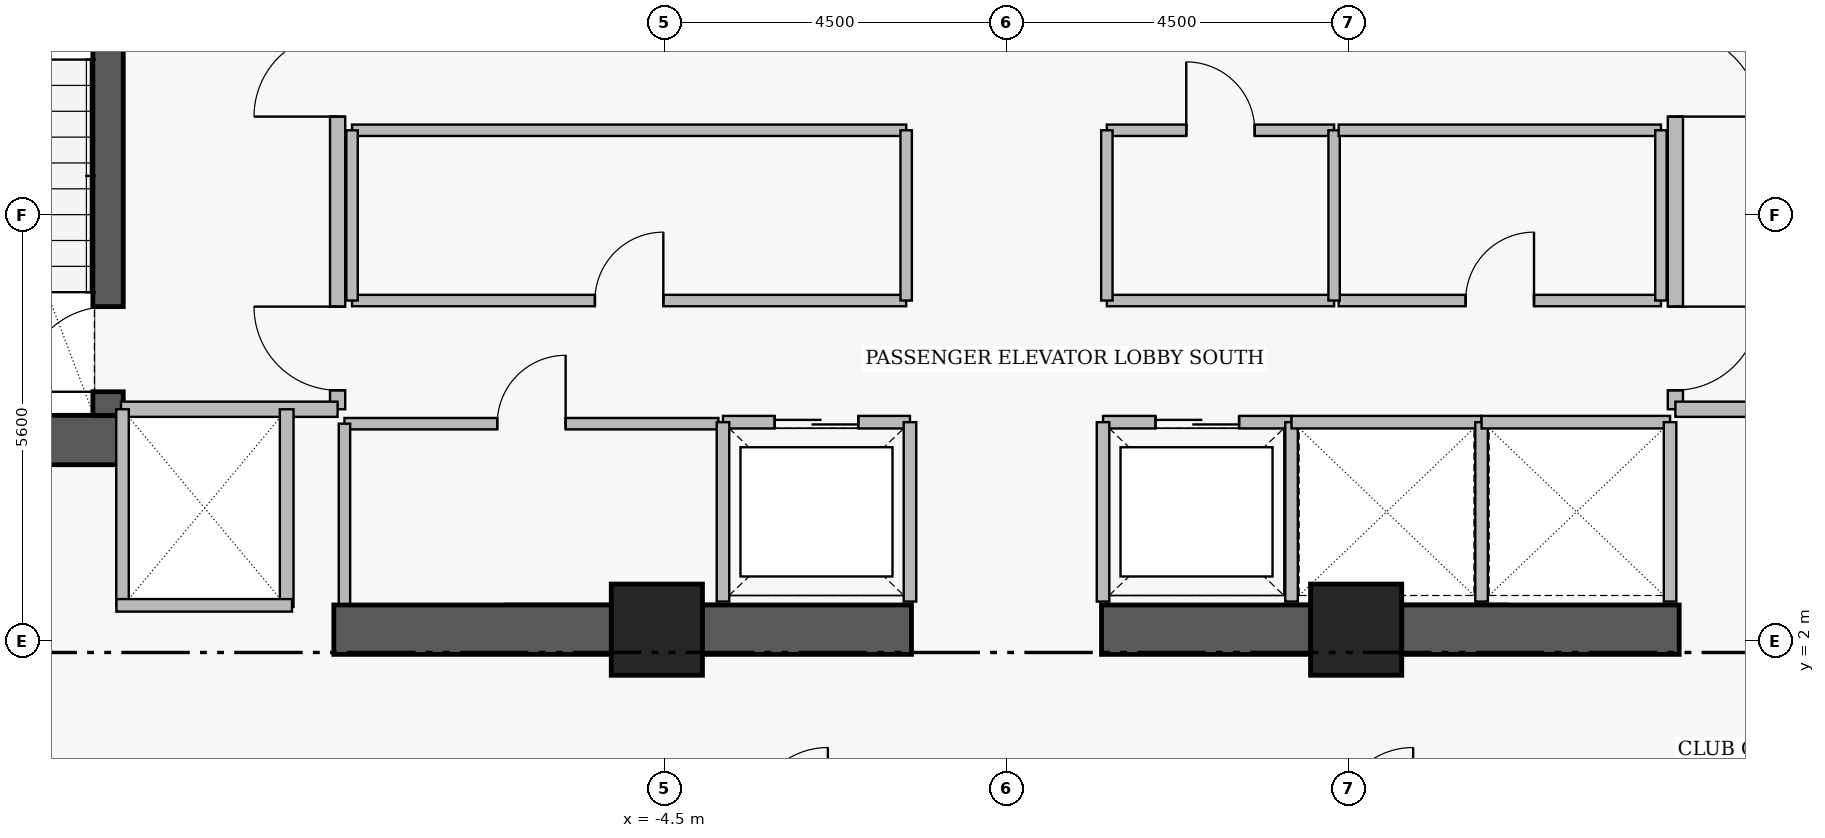
"""IFC4 building model, lengths in metres.
Left out: names, types, materials, properties, quantities, classifications, styles, units other than length and angle.
Written with IfcOpenShell. Run it as: python <this file> out.ifc"""

import sys

from ifc_helpers import new_model, si_unit, direction, frame, frame_2d, origin, origin_2d, place, context, subcontext, project, spatial, rectangle, extrude, element, fill, save


model = new_model("IFC4")
c1 = context("Model", 3, precision=1e-05, world=origin(), true_north=direction((0.0, 1.0)))
c2 = subcontext(c1, "Body", "Model", "MODEL_VIEW")
j1 = project(units=[si_unit("LENGTHUNIT", "METRE"), si_unit("PLANEANGLEUNIT", "RADIAN")], contexts=[c1])
p1 = place(None, origin())
s1 = spatial("IfcSite", under=j1, at=p1, CompositionType="ELEMENT")
p2 = place(p1, origin())
s2 = spatial("IfcBuilding", under=s1, at=p2, CompositionType="ELEMENT")
p3 = place(p2, frame((0.0, 0.0, 199.9)))
s3 = spatial("IfcBuildingStorey", under=s2, at=p3, CompositionType="ELEMENT", Elevation=199.9)
p4 = place(p3, frame((-16.06, 4.645, 0.0), z_axis=(0.0, 0.0, 1.0), x_axis=(1.0, 0.0, 0.0)))
e1 = element("IfcWall", 1, at=p4, inside=s3, PredefinedType="SHEAR", context=c2, shape_type="SweptSolid", body=[
    extrude(rectangle(XDim=4.46, YDim=0.65, at=frame_2d((2.23, 0.0))), origin(), (0.0, 0.0, 1.0), 3.56),
])
for number, where, z_axis, x_axis in (
    (2, (-8.85, 2.15, 0.0), (0.0, 0.0, 1.0), (1.0, 0.0, 0.0)),
    (3, (1.25, 2.15, 0.0), (0.0, 0.0, 1.0), (1.0, 0.0, 0.0)),
):
    element("IfcWall", number, at=place(p3, frame(where, z_axis=z_axis, x_axis=x_axis)), inside=s3, PredefinedType="SHEAR", context=c2, shape_type="SweptSolid", body=[
        extrude(rectangle(XDim=7.6, YDim=0.65, at=frame_2d((3.8, 0.0))), origin(), (0.0, 0.0, 1.0), 3.53),
    ])
p5 = place(p3, frame((-11.82, 4.97, 0.0), z_axis=(0.0, 0.0, 1.0), x_axis=(0.0, 1.0, 0.0)))
e4 = element("IfcWall", 4, at=p5, inside=s3, PredefinedType="SHEAR", context=c2, shape_type="SweptSolid", body=[
    extrude(rectangle(XDim=8.96, YDim=0.4, at=frame_2d((4.48, 0.0))), origin(), (0.0, 0.0, 1.0), 3.56),
])
p6 = place(p5, frame((0.31, 0.0, 0.0)))
e5 = element("IfcOpeningElement", 5, at=p6, cuts=e4, PredefinedType="OPENING", context=c2, shape_type="SweptSolid", body=[
    extrude(rectangle(XDim=1.12, YDim=2.22, at=frame_2d((0.56, 1.11))), frame((0.0, 0.21, 0.0), z_axis=(0.0, -1.0, 0.0), x_axis=(1.0, 0.0, 0.0)), (0.0, 0.0, 1.0), 0.42),
])
for number, where, z_axis, x_axis in (
    (6, (-4.6, 2.15, 0.0), (0.0, 0.0, 1.0), (1.0, 0.0, 0.0)),
    (7, (4.6, 2.15, 0.0), (0.0, 0.0, 1.0), (1.0, 0.0, 0.0)),
):
    element("IfcColumn", number, at=place(p3, frame(where, z_axis=z_axis, x_axis=x_axis)), inside=s3, PredefinedType="COLUMN", context=c2, shape_type="SweptSolid", body=[
        extrude(rectangle(XDim=1.2, YDim=1.2, at=origin_2d()), origin(), (0.0, 0.0, 1.0), 3.75),
    ])
p7 = place(p3, frame((-8.8, 5.05, 0.0), z_axis=(0.0, 0.0, 1.0), x_axis=(0.0, 1.0, 0.0)))
e8 = element("IfcWall", 8, at=p7, inside=s3, PredefinedType="PARTITIONING", context=c2, shape_type="SweptSolid", body=[
    extrude(rectangle(XDim=6.1, YDim=0.2, at=frame_2d((3.05, 0.0))), origin(), (0.0, 0.0, 1.0), 3.53),
])
p8 = place(p7, frame((0.25, 0.0, 0.0)))
e9 = element("IfcOpeningElement", 9, at=p8, cuts=e8, PredefinedType="OPENING", context=c2, shape_type="SweptSolid", body=[
    extrude(rectangle(XDim=1.1, YDim=2.2, at=frame_2d((0.55, 1.1))), frame((0.0, 0.11, 0.0), z_axis=(0.0, -1.0, 0.0), x_axis=(1.0, 0.0, 0.0)), (0.0, 0.0, 1.0), 0.22),
])
p9 = place(p7, frame((3.85, 0.0, 0.0)))
e10 = element("IfcOpeningElement", 10, at=p9, cuts=e8, PredefinedType="OPENING", context=c2, shape_type="SweptSolid", body=[
    extrude(rectangle(XDim=1.1, YDim=2.2, at=frame_2d((0.55, 1.1))), frame((0.0, 0.11, 0.0), z_axis=(0.0, -1.0, 0.0), x_axis=(1.0, 0.0, 0.0)), (0.0, 0.0, 1.0), 0.22),
])
p10 = place(p3, frame((8.8, 11.15, 0.0), z_axis=(0.0, 0.0, 1.0), x_axis=(0.0, -1.0, 0.0)))
e11 = element("IfcWall", 11, at=p10, inside=s3, PredefinedType="PARTITIONING", context=c2, shape_type="SweptSolid", body=[
    extrude(rectangle(XDim=6.1, YDim=0.2, at=frame_2d((3.05, 0.0))), origin(), (0.0, 0.0, 1.0), 3.53),
])
p11 = place(p10, frame((1.15, 0.0, 0.0)))
e12 = element("IfcOpeningElement", 12, at=p11, cuts=e11, PredefinedType="OPENING", context=c2, shape_type="SweptSolid", body=[
    extrude(rectangle(XDim=1.1, YDim=2.2, at=frame_2d((0.55, 1.1))), frame((0.0, 0.11, 0.0), z_axis=(0.0, -1.0, 0.0), x_axis=(1.0, 0.0, 0.0)), (0.0, 0.0, 1.0), 0.22),
])
p12 = place(p10, frame((4.75, 0.0, 0.0)))
e13 = element("IfcOpeningElement", 13, at=p12, cuts=e11, PredefinedType="OPENING", context=c2, shape_type="SweptSolid", body=[
    extrude(rectangle(XDim=1.1, YDim=2.2, at=frame_2d((0.55, 1.1))), frame((0.0, 0.11, 0.0), z_axis=(0.0, -1.0, 0.0), x_axis=(1.0, 0.0, 0.0)), (0.0, 0.0, 1.0), 0.22),
])
p13 = place(p3, frame((-3.73, 4.88, 0.0), z_axis=(0.0, 0.0, 1.0), x_axis=(1.0, 0.0, 0.0)))
e14 = element("IfcWall", 14, at=p13, inside=s3, PredefinedType="PARTITIONING", context=c2, shape_type="SweptSolid", body=[
    extrude(rectangle(XDim=2.46, YDim=0.165, at=frame_2d((1.23, 0.0))), origin(), (0.0, 0.0, 1.0), 3.53),
])
p14 = place(p13, frame((0.68, 0.0, 0.0)))
e15 = element("IfcOpeningElement", 15, at=p14, cuts=e14, PredefinedType="OPENING", context=c2, shape_type="SweptSolid", body=[
    extrude(rectangle(XDim=1.1, YDim=2.25, at=frame_2d((0.55, 1.125))), frame((0.0, 0.093, 0.0), z_axis=(0.0, -1.0, 0.0), x_axis=(1.0, 0.0, 0.0)), (0.0, 0.0, 1.0), 0.185),
])
p15 = place(p3, frame((1.27, 4.88, 0.0), z_axis=(0.0, 0.0, 1.0), x_axis=(1.0, 0.0, 0.0)))
e16 = element("IfcWall", 16, at=p15, inside=s3, PredefinedType="PARTITIONING", context=c2, shape_type="SweptSolid", body=[
    extrude(rectangle(XDim=2.48, YDim=0.165, at=frame_2d((1.24, 0.0))), origin(), (0.0, 0.0, 1.0), 3.53),
])
p16 = place(p15, frame((0.69, 0.0, 0.0)))
e17 = element("IfcOpeningElement", 17, at=p16, cuts=e16, PredefinedType="OPENING", context=c2, shape_type="SweptSolid", body=[
    extrude(rectangle(XDim=1.1, YDim=2.25, at=frame_2d((0.55, 1.125))), frame((0.0, 0.093, 0.0), z_axis=(0.0, -1.0, 0.0), x_axis=(1.0, 0.0, 0.0)), (0.0, 0.0, 1.0), 0.185),
])
p17 = place(p3, frame((-8.71, 4.86, 0.0), z_axis=(0.0, 0.0, 1.0), x_axis=(1.0, 0.0, 0.0)))
e18 = element("IfcWall", 18, at=p17, inside=s3, PredefinedType="PARTITIONING", context=c2, shape_type="SweptSolid", body=[
    extrude(rectangle(XDim=4.92, YDim=0.15, at=frame_2d((2.46, 0.0))), origin(), (0.0, 0.0, 1.0), 3.53),
])
p18 = place(p17, frame((2.01, 0.0, 0.0)))
e19 = element("IfcOpeningElement", 19, at=p18, cuts=e18, PredefinedType="OPENING", context=c2, shape_type="SweptSolid", body=[
    extrude(rectangle(XDim=0.9, YDim=2.15, at=frame_2d((0.45, 1.075))), frame((0.0, 0.085, 0.0), z_axis=(0.0, -1.0, 0.0), x_axis=(1.0, 0.0, 0.0)), (0.0, 0.0, 1.0), 0.17),
])
p19 = place(p3, frame((-8.61, 6.48, 0.0), z_axis=(0.0, 0.0, 1.0), x_axis=(1.0, 0.0, 0.0)))
e20 = element("IfcWall", 20, at=p19, inside=s3, PredefinedType="PARTITIONING", context=c2, shape_type="SweptSolid", body=[
    extrude(rectangle(XDim=7.29, YDim=0.15, at=frame_2d((3.645, 0.0))), origin(), (0.0, 0.0, 1.0), 3.53),
])
p20 = place(p19, frame((3.195, 0.0, 0.0)))
e21 = element("IfcOpeningElement", 21, at=p20, cuts=e20, PredefinedType="OPENING", context=c2, shape_type="SweptSolid", body=[
    extrude(rectangle(XDim=0.9, YDim=2.15, at=frame_2d((0.45, 1.075))), frame((0.0, 0.085, 0.0), z_axis=(0.0, -1.0, 0.0), x_axis=(1.0, 0.0, 0.0)), (0.0, 0.0, 1.0), 0.17),
])
p21 = place(p3, frame((1.32, 8.72, 0.0), z_axis=(0.0, 0.0, 1.0), x_axis=(1.0, 0.0, 0.0)))
e22 = element("IfcWall", 22, at=p21, inside=s3, PredefinedType="PARTITIONING", context=c2, shape_type="SweptSolid", body=[
    extrude(rectangle(XDim=2.99, YDim=0.15, at=frame_2d((1.495, 0.0))), origin(), (0.0, 0.0, 1.0), 3.53),
])
p22 = place(p21, frame((1.045, 0.0, 0.0)))
e23 = element("IfcOpeningElement", 23, at=p22, cuts=e22, PredefinedType="OPENING", context=c2, shape_type="SweptSolid", body=[
    extrude(rectangle(XDim=0.9, YDim=2.15, at=frame_2d((0.45, 1.075))), frame((0.0, 0.085, 0.0), z_axis=(0.0, -1.0, 0.0), x_axis=(1.0, 0.0, 0.0)), (0.0, 0.0, 1.0), 0.17),
])
p23 = place(p3, frame((4.37, 6.48, 0.0), z_axis=(0.0, 0.0, 1.0), x_axis=(1.0, 0.0, 0.0)))
e24 = element("IfcWall", 24, at=p23, inside=s3, PredefinedType="PARTITIONING", context=c2, shape_type="SweptSolid", body=[
    extrude(rectangle(XDim=4.24, YDim=0.15, at=frame_2d((2.12, 0.0))), origin(), (0.0, 0.0, 1.0), 3.53),
])
p24 = place(p23, frame((1.67, 0.0, 0.0)))
e25 = element("IfcOpeningElement", 25, at=p24, cuts=e24, PredefinedType="OPENING", context=c2, shape_type="SweptSolid", body=[
    extrude(rectangle(XDim=0.9, YDim=2.15, at=frame_2d((0.45, 1.075))), frame((0.0, 0.085, 0.0), z_axis=(0.0, -1.0, 0.0), x_axis=(1.0, 0.0, 0.0)), (0.0, 0.0, 1.0), 0.17),
])
for number, where, z_axis, x_axis in (
    (26, (-11.65, 5.05, 0.0), (0.0, 0.0, 1.0), (1.0, 0.0, 0.0)),
    (27, (8.8, 5.05, 0.0), (0.0, 0.0, 1.0), (1.0, 0.0, 0.0)),
):
    element("IfcWall", number, at=place(p3, frame(where, z_axis=z_axis, x_axis=x_axis)), inside=s3, PredefinedType="PARTITIONING", context=c2, shape_type="SweptSolid", body=[
        extrude(rectangle(XDim=2.85, YDim=0.2, at=frame_2d((1.425, 0.0))), origin(), (0.0, 0.0, 1.0), 3.53),
    ])
for number, where, z_axis, x_axis in (
    (28, (-3.73, 2.52, 0.0), (0.0, 0.0, 1.0), (0.0, 1.0, 0.0)),
    (29, (-1.27, 2.52, 0.0), (0.0, 0.0, 1.0), (0.0, 1.0, 0.0)),
    (30, (1.27, 2.52, 0.0), (0.0, 0.0, 1.0), (0.0, 1.0, 0.0)),
    (31, (3.75, 2.52, 0.0), (0.0, 0.0, 1.0), (0.0, 1.0, 0.0)),
):
    element("IfcWall", number, at=place(p3, frame(where, z_axis=z_axis, x_axis=x_axis)), inside=s3, PredefinedType="PARTITIONING", context=c2, shape_type="SweptSolid", body=[
        extrude(rectangle(XDim=2.36, YDim=0.165, at=frame_2d((1.18, 0.0))), origin(), (0.0, 0.0, 1.0), 3.53),
    ])
p25 = place(p3, frame((3.75, 4.88, 0.0), z_axis=(0.0, 0.0, 1.0), x_axis=(1.0, 0.0, 0.0)))
e32 = element("IfcWall", 32, at=p25, inside=s3, PredefinedType="PARTITIONING", context=c2, shape_type="SweptSolid", body=[
    extrude(rectangle(XDim=2.5, YDim=0.165, at=frame_2d((1.25, 0.0))), origin(), (0.0, 0.0, 1.0), 3.53),
])
p26 = place(p3, frame((6.25, 2.52, 0.0), z_axis=(0.0, 0.0, 1.0), x_axis=(0.0, 1.0, 0.0)))
e33 = element("IfcWall", 33, at=p26, inside=s3, PredefinedType="PARTITIONING", context=c2, shape_type="SweptSolid", body=[
    extrude(rectangle(XDim=2.36, YDim=0.165, at=frame_2d((1.18, 0.0))), origin(), (0.0, 0.0, 1.0), 3.53),
])
p27 = place(p3, frame((6.25, 4.88, 0.0), z_axis=(0.0, 0.0, 1.0), x_axis=(1.0, 0.0, 0.0)))
e34 = element("IfcWall", 34, at=p27, inside=s3, PredefinedType="PARTITIONING", context=c2, shape_type="SweptSolid", body=[
    extrude(rectangle(XDim=2.48, YDim=0.165, at=frame_2d((1.24, 0.0))), origin(), (0.0, 0.0, 1.0), 3.53),
])
p28 = place(p3, frame((8.73, 2.52, 0.0), z_axis=(0.0, 0.0, 1.0), x_axis=(0.0, 1.0, 0.0)))
e35 = element("IfcWall", 35, at=p28, inside=s3, PredefinedType="PARTITIONING", context=c2, shape_type="SweptSolid", body=[
    extrude(rectangle(XDim=2.36, YDim=0.165, at=frame_2d((1.18, 0.0))), origin(), (0.0, 0.0, 1.0), 3.53),
])
p29 = place(p3, frame((-8.71, 2.49, 0.0), z_axis=(0.0, 0.0, 1.0), x_axis=(0.0, 1.0, 0.0)))
e36 = element("IfcWall", 36, at=p29, inside=s3, PredefinedType="PARTITIONING", context=c2, shape_type="SweptSolid", body=[
    extrude(rectangle(XDim=2.37, YDim=0.15, at=frame_2d((1.185, 0.0))), origin(), (0.0, 0.0, 1.0), 3.53),
])
p30 = place(p3, frame((-9.47, 2.45, 0.0), z_axis=(0.0, 0.0, 1.0), x_axis=(0.0, 1.0, 0.0)))
e37 = element("IfcWall", 37, at=p30, inside=s3, PredefinedType="PARTITIONING", context=c2, shape_type="SweptSolid", body=[
    extrude(rectangle(XDim=2.6, YDim=0.18, at=frame_2d((1.3, 0.0))), origin(), (0.0, 0.0, 1.0), 3.53),
])
p31 = place(p3, frame((-11.63, 2.47, 0.0), z_axis=(0.0, 0.0, 1.0), x_axis=(0.0, 1.0, 0.0)))
e38 = element("IfcWall", 38, at=p31, inside=s3, PredefinedType="PARTITIONING", context=c2, shape_type="SweptSolid", body=[
    extrude(rectangle(XDim=2.58, YDim=0.165, at=frame_2d((1.29, 0.0))), origin(), (0.0, 0.0, 1.0), 3.53),
])
p32 = place(p3, frame((-11.71, 2.47, 0.0), z_axis=(0.0, 0.0, 1.0), x_axis=(1.0, 0.0, 0.0)))
e39 = element("IfcWall", 39, at=p32, inside=s3, PredefinedType="PARTITIONING", context=c2, shape_type="SweptSolid", body=[
    extrude(rectangle(XDim=2.31, YDim=0.165, at=frame_2d((1.155, 0.0))), origin(), (0.0, 0.0, 1.0), 2.43),
])
p33 = place(p3, frame((-8.61, 8.72, 0.0), z_axis=(0.0, 0.0, 1.0), x_axis=(1.0, 0.0, 0.0)))
e40 = element("IfcWall", 40, at=p33, inside=s3, PredefinedType="PARTITIONING", context=c2, shape_type="SweptSolid", body=[
    extrude(rectangle(XDim=7.29, YDim=0.15, at=frame_2d((3.645, 0.0))), origin(), (0.0, 0.0, 1.0), 3.53),
])
for number, where, z_axis, x_axis in (
    (41, (-8.61, 6.48, 0.0), (0.0, 0.0, 1.0), (0.0, 1.0, 0.0)),
    (42, (-1.32, 6.48, 0.0), (0.0, 0.0, 1.0), (0.0, 1.0, 0.0)),
):
    element("IfcWall", number, at=place(p3, frame(where, z_axis=z_axis, x_axis=x_axis)), inside=s3, PredefinedType="PARTITIONING", context=c2, shape_type="SweptSolid", body=[
        extrude(rectangle(XDim=2.24, YDim=0.15, at=frame_2d((1.12, 0.0))), origin(), (0.0, 0.0, 1.0), 3.53),
    ])
p34 = place(p3, frame((1.32, 6.48, 0.0), z_axis=(0.0, 0.0, 1.0), x_axis=(1.0, 0.0, 0.0)))
e43 = element("IfcWall", 43, at=p34, inside=s3, PredefinedType="PARTITIONING", context=c2, shape_type="SweptSolid", body=[
    extrude(rectangle(XDim=2.99, YDim=0.15, at=frame_2d((1.495, 0.0))), origin(), (0.0, 0.0, 1.0), 3.53),
])
for number, where, z_axis, x_axis in (
    (44, (1.32, 6.48, 0.0), (0.0, 0.0, 1.0), (0.0, 1.0, 0.0)),
    (45, (4.31, 6.48, 0.0), (0.0, 0.0, 1.0), (0.0, 1.0, 0.0)),
):
    element("IfcWall", number, at=place(p3, frame(where, z_axis=z_axis, x_axis=x_axis)), inside=s3, PredefinedType="PARTITIONING", context=c2, shape_type="SweptSolid", body=[
        extrude(rectangle(XDim=2.24, YDim=0.15, at=frame_2d((1.12, 0.0))), origin(), (0.0, 0.0, 1.0), 3.53),
    ])
p35 = place(p3, frame((4.37, 8.72, 0.0), z_axis=(0.0, 0.0, 1.0), x_axis=(1.0, 0.0, 0.0)))
e46 = element("IfcWall", 46, at=p35, inside=s3, PredefinedType="PARTITIONING", context=c2, shape_type="SweptSolid", body=[
    extrude(rectangle(XDim=4.24, YDim=0.15, at=frame_2d((2.12, 0.0))), origin(), (0.0, 0.0, 1.0), 3.53),
])
p36 = place(p3, frame((8.61, 6.48, 0.0), z_axis=(0.0, 0.0, 1.0), x_axis=(0.0, 1.0, 0.0)))
e47 = element("IfcWall", 47, at=p36, inside=s3, PredefinedType="PARTITIONING", context=c2, shape_type="SweptSolid", body=[
    extrude(rectangle(XDim=2.24, YDim=0.15, at=frame_2d((1.12, 0.0))), origin(), (0.0, 0.0, 1.0), 3.53),
])
p37 = place(p6, origin())
e48 = element("IfcDoor", 48, at=p37, inside=s3, OperationType="SINGLE_SWING_LEFT", PredefinedType="DOOR", context=c2, shape_type="SweptSolid", body=[
    extrude(rectangle(XDim=1.12, YDim=2.22, at=frame_2d((0.56, 1.11))), frame((0.0, 0.025, 0.0), z_axis=(0.0, -1.0, 0.0), x_axis=(1.0, 0.0, 0.0)), (0.0, 0.0, 1.0), 0.05),
])
fill(e5, e48)
p38 = place(p8, origin())
e49 = element("IfcDoor", 49, at=p38, inside=s3, OperationType="SINGLE_SWING_RIGHT", PredefinedType="DOOR", context=c2, shape_type="SweptSolid", body=[
    extrude(rectangle(XDim=1.1, YDim=2.2, at=frame_2d((0.55, 1.1))), frame((0.0, 0.025, 0.0), z_axis=(0.0, -1.0, 0.0), x_axis=(1.0, 0.0, 0.0)), (0.0, 0.0, 1.0), 0.05),
])
fill(e9, e49)
p39 = place(p9, origin())
e50 = element("IfcDoor", 50, at=p39, inside=s3, OperationType="SINGLE_SWING_LEFT", PredefinedType="DOOR", context=c2, shape_type="SweptSolid", body=[
    extrude(rectangle(XDim=1.1, YDim=2.2, at=frame_2d((0.55, 1.1))), frame((0.0, 0.025, 0.0), z_axis=(0.0, -1.0, 0.0), x_axis=(1.0, 0.0, 0.0)), (0.0, 0.0, 1.0), 0.05),
])
fill(e10, e50)
p40 = place(p11, origin())
e51 = element("IfcDoor", 51, at=p40, inside=s3, OperationType="SINGLE_SWING_RIGHT", PredefinedType="DOOR", context=c2, shape_type="SweptSolid", body=[
    extrude(rectangle(XDim=1.1, YDim=2.2, at=frame_2d((0.55, 1.1))), frame((0.0, 0.025, 0.0), z_axis=(0.0, -1.0, 0.0), x_axis=(1.0, 0.0, 0.0)), (0.0, 0.0, 1.0), 0.05),
])
fill(e12, e51)
p41 = place(p12, origin())
e52 = element("IfcDoor", 52, at=p41, inside=s3, OperationType="SINGLE_SWING_LEFT", PredefinedType="DOOR", context=c2, shape_type="SweptSolid", body=[
    extrude(rectangle(XDim=1.1, YDim=2.2, at=frame_2d((0.55, 1.1))), frame((0.0, 0.025, 0.0), z_axis=(0.0, -1.0, 0.0), x_axis=(1.0, 0.0, 0.0)), (0.0, 0.0, 1.0), 0.05),
])
fill(e13, e52)
p42 = place(p14, origin())
e53 = element("IfcDoor", 53, at=p42, inside=s3, OperationType="SLIDING_TO_LEFT", PredefinedType="DOOR", context=c2, shape_type="SweptSolid", body=[
    extrude(rectangle(XDim=1.1, YDim=2.25, at=frame_2d((0.55, 1.125))), frame((0.0, 0.025, 0.0), z_axis=(0.0, -1.0, 0.0), x_axis=(1.0, 0.0, 0.0)), (0.0, 0.0, 1.0), 0.05),
])
fill(e15, e53)
p43 = place(p16, origin())
e54 = element("IfcDoor", 54, at=p43, inside=s3, OperationType="SLIDING_TO_LEFT", PredefinedType="DOOR", context=c2, shape_type="SweptSolid", body=[
    extrude(rectangle(XDim=1.1, YDim=2.25, at=frame_2d((0.55, 1.125))), frame((0.0, 0.025, 0.0), z_axis=(0.0, -1.0, 0.0), x_axis=(1.0, 0.0, 0.0)), (0.0, 0.0, 1.0), 0.05),
])
fill(e17, e54)
p44 = place(p18, origin())
e55 = element("IfcDoor", 55, at=p44, inside=s3, OperationType="SINGLE_SWING_RIGHT", PredefinedType="DOOR", context=c2, shape_type="SweptSolid", body=[
    extrude(rectangle(XDim=0.9, YDim=2.15, at=frame_2d((0.45, 1.075))), frame((0.0, 0.025, 0.0), z_axis=(0.0, -1.0, 0.0), x_axis=(1.0, 0.0, 0.0)), (0.0, 0.0, 1.0), 0.05),
])
fill(e19, e55)
p45 = place(p20, origin())
e56 = element("IfcDoor", 56, at=p45, inside=s3, OperationType="SINGLE_SWING_RIGHT", PredefinedType="DOOR", context=c2, shape_type="SweptSolid", body=[
    extrude(rectangle(XDim=0.9, YDim=2.15, at=frame_2d((0.45, 1.075))), frame((0.0, 0.025, 0.0), z_axis=(0.0, -1.0, 0.0), x_axis=(1.0, 0.0, 0.0)), (0.0, 0.0, 1.0), 0.05),
])
fill(e21, e56)
p46 = place(p22, origin())
e57 = element("IfcDoor", 57, at=p46, inside=s3, OperationType="SINGLE_SWING_LEFT", PredefinedType="DOOR", context=c2, shape_type="SweptSolid", body=[
    extrude(rectangle(XDim=0.9, YDim=2.15, at=frame_2d((0.45, 1.075))), frame((0.0, 0.025, 0.0), z_axis=(0.0, -1.0, 0.0), x_axis=(1.0, 0.0, 0.0)), (0.0, 0.0, 1.0), 0.05),
])
fill(e23, e57)
p47 = place(p24, origin())
e58 = element("IfcDoor", 58, at=p47, inside=s3, OperationType="SINGLE_SWING_RIGHT", PredefinedType="DOOR", context=c2, shape_type="SweptSolid", body=[
    extrude(rectangle(XDim=0.9, YDim=2.15, at=frame_2d((0.45, 1.075))), frame((0.0, 0.025, 0.0), z_axis=(0.0, -1.0, 0.0), x_axis=(1.0, 0.0, 0.0)), (0.0, 0.0, 1.0), 0.05),
])
fill(e25, e58)
save(model, sys.argv[1])
